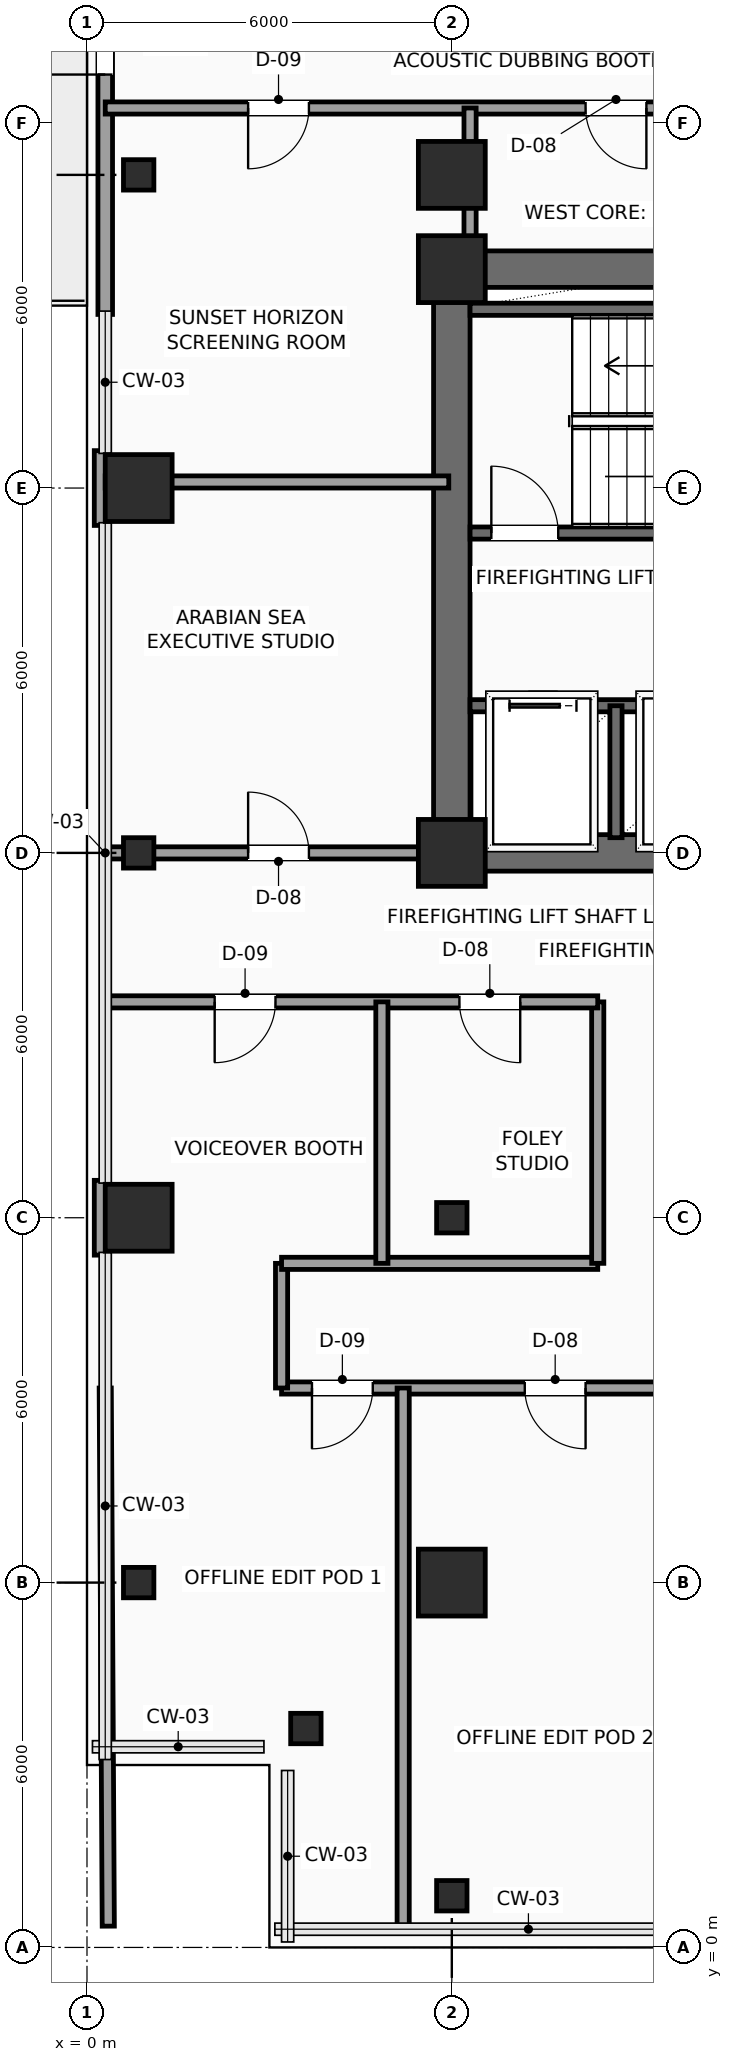
"""IFC4 building model, lengths in metres.
Left out: names, types, materials, properties, quantities, classifications, styles, units other than length and angle.
Written with IfcOpenShell. Run it as: python <this file> out.ifc"""

import sys

from ifc_helpers import new_model, si_unit, direction, frame, frame_2d, origin, origin_2d, place, context, subcontext, project, spatial, rectangle, hollow_rectangle, extrude, element, fill, save


model = new_model("IFC4")
c1 = context("Model", 3, precision=1e-05, world=origin(), true_north=direction((0.0, 1.0)))
c2 = subcontext(c1, "Body", "Model", "MODEL_VIEW")
j1 = project(units=[si_unit("LENGTHUNIT", "METRE"), si_unit("PLANEANGLEUNIT", "RADIAN")], contexts=[c1])
p1 = place(None, origin())
s1 = spatial("IfcSite", under=j1, at=p1, CompositionType="ELEMENT")
p2 = place(p1, origin())
s2 = spatial("IfcBuilding", under=s1, at=p2, CompositionType="ELEMENT")
p3 = place(p2, frame((0.0, 0.0, 119.4)))
s3 = spatial("IfcBuildingStorey", under=s2, at=p3, CompositionType="ELEMENT", Elevation=119.4)
for number, where, z_axis, x_axis in (
    (1, (6.0, 18.0, 0.0), (0.0, 0.0, 1.0), (1.0, 0.0, 0.0)),
    (2, (6.0, 27.6, 0.0), (0.0, 0.0, 1.0), (1.0, 0.0, 0.0)),
):
    element("IfcColumn", number, at=place(p3, frame(where, z_axis=z_axis, x_axis=x_axis)), inside=s3, PredefinedType="COLUMN", context=c2, shape_type="SweptSolid", body=[
        extrude(rectangle(XDim=1.1, YDim=1.1, at=origin_2d()), origin(), (0.0, 0.0, 1.0), 3.75),
    ])
for number, where, z_axis, x_axis in (
    (3, (3.6, 3.6, 0.0), (0.0, 0.0, 1.0), (1.0, 0.0, 0.0)),
    (4, (0.85, 6.0, 0.0), (0.0, 0.0, 1.0), (1.0, 0.0, 0.0)),
):
    element("IfcColumn", number, at=place(p3, frame(where, z_axis=z_axis, x_axis=x_axis)), inside=s3, PredefinedType="COLUMN", context=c2, shape_type="SweptSolid", body=[
        extrude(hollow_rectangle(XDim=0.5, YDim=0.5, WallThickness=0.025, InnerFilletRadius=0.025, OuterFilletRadius=0.04, at=origin_2d()), origin(), (0.0, 0.0, 1.0), 3.75),
    ])
p4 = place(p3, frame((0.85, 12.0, 0.0), z_axis=(0.0, 0.0, 1.0), x_axis=(1.0, 0.0, 0.0)))
e5 = element("IfcColumn", 5, at=p4, inside=s3, PredefinedType="COLUMN", context=c2, shape_type="SweptSolid", body=[
    extrude(rectangle(XDim=1.1, YDim=1.1, at=origin_2d()), origin(), (0.0, 0.0, 1.0), 3.75),
])
p5 = place(p3, frame((0.85, 18.0, 0.0), z_axis=(0.0, 0.0, 1.0), x_axis=(1.0, 0.0, 0.0)))
e6 = element("IfcColumn", 6, at=p5, inside=s3, PredefinedType="COLUMN", context=c2, shape_type="SweptSolid", body=[
    extrude(hollow_rectangle(XDim=0.5, YDim=0.5, WallThickness=0.025, InnerFilletRadius=0.025, OuterFilletRadius=0.04, at=origin_2d()), origin(), (0.0, 0.0, 1.0), 3.75),
])
p6 = place(p3, frame((0.85, 24.0, 0.0), z_axis=(0.0, 0.0, 1.0), x_axis=(1.0, 0.0, 0.0)))
e7 = element("IfcColumn", 7, at=p6, inside=s3, PredefinedType="COLUMN", context=c2, shape_type="SweptSolid", body=[
    extrude(rectangle(XDim=1.1, YDim=1.1, at=origin_2d()), origin(), (0.0, 0.0, 1.0), 3.75),
])
for number, where, z_axis, x_axis in (
    (8, (0.85, 29.15, 0.0), (0.0, 0.0, 1.0), (1.0, 0.0, 0.0)),
    (9, (6.0, 0.85, 0.0), (0.0, 0.0, 1.0), (1.0, 0.0, 0.0)),
):
    element("IfcColumn", number, at=place(p3, frame(where, z_axis=z_axis, x_axis=x_axis)), inside=s3, PredefinedType="COLUMN", context=c2, shape_type="SweptSolid", body=[
        extrude(hollow_rectangle(XDim=0.5, YDim=0.5, WallThickness=0.025, InnerFilletRadius=0.025, OuterFilletRadius=0.04, at=origin_2d()), origin(), (0.0, 0.0, 1.0), 3.75),
    ])
p7 = place(p3, frame((6.0, 6.0, 0.0), z_axis=(0.0, 0.0, 1.0), x_axis=(1.0, 0.0, 0.0)))
e10 = element("IfcColumn", 10, at=p7, inside=s3, PredefinedType="COLUMN", context=c2, shape_type="SweptSolid", body=[
    extrude(rectangle(XDim=1.1, YDim=1.1, at=origin_2d()), origin(), (0.0, 0.0, 1.0), 3.75),
])
p8 = place(p3, frame((6.0, 12.0, 0.0), z_axis=(0.0, 0.0, 1.0), x_axis=(1.0, 0.0, 0.0)))
e11 = element("IfcColumn", 11, at=p8, inside=s3, PredefinedType="COLUMN", context=c2, shape_type="SweptSolid", body=[
    extrude(hollow_rectangle(XDim=0.5, YDim=0.5, WallThickness=0.025, InnerFilletRadius=0.025, OuterFilletRadius=0.04, at=origin_2d()), origin(), (0.0, 0.0, 1.0), 3.75),
])
p9 = place(p3, frame((6.0, 29.15, 0.0), z_axis=(0.0, 0.0, 1.0), x_axis=(1.0, 0.0, 0.0)))
e12 = element("IfcColumn", 12, at=p9, inside=s3, PredefinedType="COLUMN", context=c2, shape_type="SweptSolid", body=[
    extrude(rectangle(XDim=1.1, YDim=1.1, at=origin_2d()), origin(), (0.0, 0.0, 1.0), 3.75),
])
p10 = place(p3, frame((0.3, 26.855, 0.0), z_axis=(0.0, 0.0, 1.0), x_axis=(0.0, 1.0, 0.0)))
e13 = element("IfcWall", 13, at=p10, inside=s3, PredefinedType="SOLIDWALL", context=c2, shape_type="SweptSolid", body=[
    extrude(rectangle(XDim=9.29, YDim=0.24, at=frame_2d((4.645, 0.0))), origin(), (0.0, 0.0, 1.0), 3.525),
])
p11 = place(p10, frame((3.945, 0.0, 0.0)))
e14 = element("IfcOpeningElement", 14, at=p11, cuts=e13, PredefinedType="OPENING", context=c2, shape_type="SweptSolid", body=[
    extrude(rectangle(XDim=1.05, YDim=2.2, at=frame_2d((0.525, 1.1))), frame((0.0, 0.13, 0.0), z_axis=(0.0, -1.0, 0.0), x_axis=(1.0, 0.0, 0.0)), (0.0, 0.0, 1.0), 0.26),
])
for number, where, z_axis, x_axis in (
    (15, (0.24, 11.385, 0.0), (0.0, 0.0, 1.0), (0.0, 1.0, 0.0)),
    (16, (0.24, 23.385, 0.0), (0.0, 0.0, 1.0), (0.0, 1.0, 0.0)),
):
    element("IfcWall", number, at=place(p3, frame(where, z_axis=z_axis, x_axis=x_axis)), inside=s3, PredefinedType="SOLIDWALL", context=c2, shape_type="SweptSolid", body=[
        extrude(rectangle(XDim=1.23, YDim=0.24, at=frame_2d((0.615, 0.0))), origin(), (0.0, 0.0, 1.0), 3.525),
    ])
p12 = place(p3, frame((6.0, 18.0, 0.0), z_axis=(0.0, 0.0, 1.0), x_axis=(1.0, 0.0, 0.0)))
e17 = element("IfcWall", 17, at=p12, inside=s3, PredefinedType="SHEAR", context=c2, shape_type="SweptSolid", body=[
    extrude(rectangle(XDim=12.0, YDim=0.6, at=frame_2d((6.0, 0.0))), origin(), (0.0, 0.0, 1.0), 3.525),
])
p13 = place(p12, frame((7.15, 0.0, 0.0)))
e18 = element("IfcOpeningElement", 18, at=p13, cuts=e17, PredefinedType="OPENING", context=c2, shape_type="SweptSolid", body=[
    extrude(rectangle(XDim=1.6, YDim=2.3, at=frame_2d((0.8, 1.15))), frame((0.0, 0.31, 0.0), z_axis=(0.0, -1.0, 0.0), x_axis=(1.0, 0.0, 0.0)), (0.0, 0.0, 1.0), 0.62),
])
p14 = place(p3, frame((6.0, 27.6, 0.0), z_axis=(0.0, 0.0, 1.0), x_axis=(1.0, 0.0, 0.0)))
e19 = element("IfcWall", 19, at=p14, inside=s3, PredefinedType="SHEAR", context=c2, shape_type="SweptSolid", body=[
    extrude(rectangle(XDim=12.0, YDim=0.6, at=frame_2d((6.0, 0.0))), origin(), (0.0, 0.0, 1.0), 3.525),
])
p15 = place(p14, frame((10.2, 0.0, 0.0)))
e20 = element("IfcOpeningElement", 20, at=p15, cuts=e19, PredefinedType="OPENING", context=c2, shape_type="SweptSolid", body=[
    extrude(rectangle(XDim=0.9, YDim=2.15, at=frame_2d((0.45, 1.075))), frame((0.0, 0.31, 0.0), z_axis=(0.0, -1.0, 0.0), x_axis=(1.0, 0.0, 0.0)), (0.0, 0.0, 1.0), 0.62),
])
p16 = place(p3, frame((6.0, 18.0, 0.0), z_axis=(0.0, 0.0, 1.0), x_axis=(0.0, 1.0, 0.0)))
e21 = element("IfcWall", 21, at=p16, inside=s3, PredefinedType="SHEAR", context=c2, shape_type="SweptSolid", body=[
    extrude(rectangle(XDim=9.6, YDim=0.6, at=frame_2d((4.8, 0.0))), origin(), (0.0, 0.0, 1.0), 3.525),
])
p17 = place(p3, frame((6.3, 23.26, 0.0), z_axis=(0.0, 0.0, 1.0), x_axis=(1.0, 0.0, 0.0)))
e22 = element("IfcWall", 22, at=p17, inside=s3, PredefinedType="SHEAR", context=c2, shape_type="SweptSolid", body=[
    extrude(rectangle(XDim=8.88, YDim=0.2, at=frame_2d((4.44, 0.0))), origin(), (0.0, 0.0, 1.0), 3.525),
])
p18 = place(p17, frame((0.35, 0.0, 0.0)))
e23 = element("IfcOpeningElement", 23, at=p18, cuts=e22, PredefinedType="OPENING", context=c2, shape_type="SweptSolid", body=[
    extrude(rectangle(XDim=1.1, YDim=2.2, at=frame_2d((0.55, 1.1))), frame((0.0, 0.11, 0.0), z_axis=(0.0, -1.0, 0.0), x_axis=(1.0, 0.0, 0.0)), (0.0, 0.0, 1.0), 0.22),
])
p19 = place(p3, frame((6.3, 26.94, 0.0), z_axis=(0.0, 0.0, 1.0), x_axis=(1.0, 0.0, 0.0)))
e24 = element("IfcWall", 24, at=p19, inside=s3, PredefinedType="SHEAR", context=c2, shape_type="SweptSolid", body=[
    extrude(rectangle(XDim=8.88, YDim=0.2, at=frame_2d((4.44, 0.0))), origin(), (0.0, 0.0, 1.0), 3.525),
])
p20 = place(p3, frame((6.3, 20.42, 0.0), z_axis=(0.0, 0.0, 1.0), x_axis=(1.0, 0.0, 0.0)))
e25 = element("IfcWall", 25, at=p20, inside=s3, PredefinedType="SHEAR", context=c2, shape_type="SweptSolid", body=[
    extrude(rectangle(XDim=4.95, YDim=0.2, at=frame_2d((2.475, 0.0))), origin(), (0.0, 0.0, 1.0), 3.525),
])
p21 = place(p20, frame((0.65, 0.0, 0.0)))
e26 = element("IfcOpeningElement", 26, at=p21, cuts=e25, PredefinedType="OPENING", context=c2, shape_type="SweptSolid", body=[
    extrude(rectangle(XDim=1.1, YDim=2.2, at=frame_2d((0.55, 1.1))), frame((0.0, 0.11, 0.0), z_axis=(0.0, -1.0, 0.0), x_axis=(1.0, 0.0, 0.0)), (0.0, 0.0, 1.0), 0.22),
])
p22 = place(p20, frame((3.05, 0.0, 0.0)))
e27 = element("IfcOpeningElement", 27, at=p22, cuts=e25, PredefinedType="OPENING", context=c2, shape_type="SweptSolid", body=[
    extrude(rectangle(XDim=1.1, YDim=2.2, at=frame_2d((0.55, 1.1))), frame((0.0, 0.11, 0.0), z_axis=(0.0, -1.0, 0.0), x_axis=(1.0, 0.0, 0.0)), (0.0, 0.0, 1.0), 0.22),
])
p23 = place(p3, frame((8.7, 18.25, 0.0), z_axis=(0.0, 0.0, 1.0), x_axis=(0.0, 1.0, 0.0)))
e28 = element("IfcWall", 28, at=p23, inside=s3, PredefinedType="SHEAR", context=c2, shape_type="SweptSolid", body=[
    extrude(rectangle(XDim=2.17, YDim=0.2, at=frame_2d((1.085, 0.0))), origin(), (0.0, 0.0, 1.0), 3.525),
])
p24 = place(p3, frame((21.35, 9.2, 0.0), z_axis=(0.0, 0.0, 1.0), x_axis=(-1.0, 0.0, 0.0)))
e29 = element("IfcWall", 29, at=p24, inside=s3, PredefinedType="SOLIDWALL", context=c2, shape_type="SweptSolid", body=[
    extrude(rectangle(XDim=18.15, YDim=0.2, at=frame_2d((9.075, 0.0))), origin(), (0.0, 0.0, 1.0), 3.067),
])
p25 = place(p24, frame((16.65, 0.0, 0.0)))
e30 = element("IfcOpeningElement", 30, at=p25, cuts=e29, PredefinedType="OPENING", context=c2, shape_type="SweptSolid", body=[
    extrude(rectangle(XDim=1.0, YDim=2.2, at=frame_2d((0.5, 1.1))), frame((0.0, 0.11, 0.0), z_axis=(0.0, -1.0, 0.0), x_axis=(1.0, 0.0, 0.0)), (0.0, 0.0, 1.0), 0.22),
])
p26 = place(p24, frame((13.15, 0.0, 0.0)))
e31 = element("IfcOpeningElement", 31, at=p26, cuts=e29, PredefinedType="OPENING", context=c2, shape_type="SweptSolid", body=[
    extrude(rectangle(XDim=1.0, YDim=2.2, at=frame_2d((0.5, 1.1))), frame((0.0, 0.11, 0.0), z_axis=(0.0, -1.0, 0.0), x_axis=(1.0, 0.0, 0.0)), (0.0, 0.0, 1.0), 0.22),
])
p27 = place(p24, frame((8.15, 0.0, 0.0)))
e32 = element("IfcOpeningElement", 32, at=p27, cuts=e29, PredefinedType="OPENING", context=c2, shape_type="SweptSolid", body=[
    extrude(rectangle(XDim=1.0, YDim=2.2, at=frame_2d((0.5, 1.1))), frame((0.0, 0.11, 0.0), z_axis=(0.0, -1.0, 0.0), x_axis=(1.0, 0.0, 0.0)), (0.0, 0.0, 1.0), 0.22),
])
p28 = place(p24, frame((2.575, 0.0, 0.0)))
e33 = element("IfcOpeningElement", 33, at=p28, cuts=e29, PredefinedType="OPENING", context=c2, shape_type="SweptSolid", body=[
    extrude(rectangle(XDim=1.0, YDim=2.2, at=frame_2d((0.5, 1.1))), frame((0.0, 0.11, 0.0), z_axis=(0.0, -1.0, 0.0), x_axis=(1.0, 0.0, 0.0)), (0.0, 0.0, 1.0), 0.22),
])
p29 = place(p3, frame((3.2, 9.2, 0.0), z_axis=(0.0, 0.0, 1.0), x_axis=(0.0, 1.0, 0.0)))
e34 = element("IfcWall", 34, at=p29, inside=s3, PredefinedType="SOLIDWALL", context=c2, shape_type="SweptSolid", body=[
    extrude(rectangle(XDim=2.05, YDim=0.2, at=frame_2d((1.025, 0.0))), origin(), (0.0, 0.0, 1.0), 3.525),
])
p30 = place(p3, frame((3.2, 11.25, 0.0), z_axis=(0.0, 0.0, 1.0), x_axis=(1.0, 0.0, 0.0)))
e35 = element("IfcWall", 35, at=p30, inside=s3, PredefinedType="SOLIDWALL", context=c2, shape_type="SweptSolid", body=[
    extrude(rectangle(XDim=5.2, YDim=0.2, at=frame_2d((2.6, 0.0))), origin(), (0.0, 0.0, 1.0), 3.525),
])
p31 = place(p3, frame((8.4, 11.25, 0.0), z_axis=(0.0, 0.0, 1.0), x_axis=(0.0, 1.0, 0.0)))
e36 = element("IfcWall", 36, at=p31, inside=s3, PredefinedType="SOLIDWALL", context=c2, shape_type="SweptSolid", body=[
    extrude(rectangle(XDim=4.3, YDim=0.2, at=frame_2d((2.15, 0.0))), origin(), (0.0, 0.0, 1.0), 3.525),
])
p32 = place(p3, frame((8.4, 15.55, 0.0), z_axis=(0.0, 0.0, 1.0), x_axis=(-1.0, 0.0, 0.0)))
e37 = element("IfcWall", 37, at=p32, inside=s3, PredefinedType="SOLIDWALL", context=c2, shape_type="SweptSolid", body=[
    extrude(rectangle(XDim=8.1, YDim=0.2, at=frame_2d((4.05, 0.0))), origin(), (0.0, 0.0, 1.0), 3.525),
])
p33 = place(p32, frame((5.3, 0.0, 0.0)))
e38 = element("IfcOpeningElement", 38, at=p33, cuts=e37, PredefinedType="OPENING", context=c2, shape_type="SweptSolid", body=[
    extrude(rectangle(XDim=1.0, YDim=2.2, at=frame_2d((0.5, 1.1))), frame((0.0, 0.11, 0.0), z_axis=(0.0, -1.0, 0.0), x_axis=(1.0, 0.0, 0.0)), (0.0, 0.0, 1.0), 0.22),
])
p34 = place(p32, frame((1.275, 0.0, 0.0)))
e39 = element("IfcOpeningElement", 39, at=p34, cuts=e37, PredefinedType="OPENING", context=c2, shape_type="SweptSolid", body=[
    extrude(rectangle(XDim=1.0, YDim=2.2, at=frame_2d((0.5, 1.1))), frame((0.0, 0.11, 0.0), z_axis=(0.0, -1.0, 0.0), x_axis=(1.0, 0.0, 0.0)), (0.0, 0.0, 1.0), 0.22),
])
p35 = place(p3, frame((15.88, 30.25, 0.0), z_axis=(0.0, 0.0, 1.0), x_axis=(-1.0, 0.0, 0.0)))
e40 = element("IfcWall", 40, at=p35, inside=s3, PredefinedType="SOLIDWALL", context=c2, shape_type="SweptSolid", body=[
    extrude(rectangle(XDim=15.58, YDim=0.2, at=frame_2d((7.79, 0.0))), origin(), (0.0, 0.0, 1.0), 3.525),
])
p36 = place(p35, frame((12.23, 0.0, 0.0)))
e41 = element("IfcOpeningElement", 41, at=p36, cuts=e40, PredefinedType="OPENING", context=c2, shape_type="SweptSolid", body=[
    extrude(rectangle(XDim=1.0, YDim=2.2, at=frame_2d((0.5, 1.1))), frame((0.0, 0.11, 0.0), z_axis=(0.0, -1.0, 0.0), x_axis=(1.0, 0.0, 0.0)), (0.0, 0.0, 1.0), 0.22),
])
p37 = place(p35, frame((6.68, 0.0, 0.0)))
e42 = element("IfcOpeningElement", 42, at=p37, cuts=e40, PredefinedType="OPENING", context=c2, shape_type="SweptSolid", body=[
    extrude(rectangle(XDim=1.0, YDim=2.2, at=frame_2d((0.5, 1.1))), frame((0.0, 0.11, 0.0), z_axis=(0.0, -1.0, 0.0), x_axis=(1.0, 0.0, 0.0)), (0.0, 0.0, 1.0), 0.22),
])
p38 = place(p35, frame((1.93, 0.0, 0.0)))
e43 = element("IfcOpeningElement", 43, at=p38, cuts=e40, PredefinedType="OPENING", context=c2, shape_type="SweptSolid", body=[
    extrude(rectangle(XDim=1.0, YDim=2.2, at=frame_2d((0.5, 1.1))), frame((0.0, 0.11, 0.0), z_axis=(0.0, -1.0, 0.0), x_axis=(1.0, 0.0, 0.0)), (0.0, 0.0, 1.0), 0.22),
])
p39 = place(p3, frame((0.3, 18.0, 0.0), z_axis=(0.0, 0.0, 1.0), x_axis=(1.0, 0.0, 0.0)))
e44 = element("IfcWall", 44, at=p39, inside=s3, PredefinedType="PARTITIONING", context=c2, shape_type="SweptSolid", body=[
    extrude(rectangle(XDim=5.65, YDim=0.2, at=frame_2d((2.825, 0.0))), origin(), (0.0, 0.0, 1.0), 3.017),
])
p40 = place(p39, frame((2.35, 0.0, 0.0)))
e45 = element("IfcOpeningElement", 45, at=p40, cuts=e44, PredefinedType="OPENING", context=c2, shape_type="SweptSolid", body=[
    extrude(rectangle(XDim=1.0, YDim=2.2, at=frame_2d((0.5, 1.1))), frame((0.0, 0.11, 0.0), z_axis=(0.0, -1.0, 0.0), x_axis=(1.0, 0.0, 0.0)), (0.0, 0.0, 1.0), 0.22),
])
p41 = place(p3, frame((0.3, 24.1, 0.0), z_axis=(0.0, 0.0, 1.0), x_axis=(1.0, 0.0, 0.0)))
e46 = element("IfcWall", 46, at=p41, inside=s3, PredefinedType="PARTITIONING", context=c2, shape_type="SweptSolid", body=[
    extrude(rectangle(XDim=5.65, YDim=0.2, at=frame_2d((2.825, 0.0))), origin(), (0.0, 0.0, 1.0), 3.525),
])
p42 = place(p3, frame((6.3, 27.65, 0.0), z_axis=(0.0, 0.0, 1.0), x_axis=(0.0, 1.0, 0.0)))
e47 = element("IfcWall", 47, at=p42, inside=s3, PredefinedType="PARTITIONING", context=c2, shape_type="SweptSolid", body=[
    extrude(rectangle(XDim=2.6, YDim=0.2, at=frame_2d((1.3, 0.0))), origin(), (0.0, 0.0, 1.0), 3.017),
])
p43 = place(p3, frame((0.35, 0.35, 0.0), z_axis=(0.0, 0.0, 1.0), x_axis=(-0.005655237989, 0.999984009014, 0.0)))
e48 = element("IfcWall", 48, at=p43, inside=s3, PredefinedType="PARTITIONING", context=c2, shape_type="SweptSolid", body=[
    extrude(rectangle(XDim=8.85, YDim=0.2, at=frame_2d((4.425, 0.0))), origin(), (0.0, 0.0, 1.0), 3.525),
])
p44 = place(p3, frame((5.2, 0.3, 0.0), z_axis=(0.0, 0.0, 1.0), x_axis=(0.0, 1.0, 0.0)))
e49 = element("IfcWall", 49, at=p44, inside=s3, PredefinedType="PARTITIONING", context=c2, shape_type="SweptSolid", body=[
    extrude(rectangle(XDim=8.9, YDim=0.2, at=frame_2d((4.45, 0.0))), origin(), (0.0, 0.0, 1.0), 3.525),
])
p45 = place(p3, frame((4.85, 11.25, 0.0), z_axis=(0.0, 0.0, 1.0), x_axis=(0.0, 1.0, 0.0)))
e50 = element("IfcWall", 50, at=p45, inside=s3, PredefinedType="PARTITIONING", context=c2, shape_type="SweptSolid", body=[
    extrude(rectangle(XDim=4.3, YDim=0.2, at=frame_2d((2.15, 0.0))), origin(), (0.0, 0.0, 1.0), 3.525),
])
p46 = place(p11, origin())
e51 = element("IfcDoor", 51, at=p46, inside=s3, OperationType="SINGLE_SWING_LEFT", PredefinedType="DOOR", context=c2, shape_type="SweptSolid", body=[
    extrude(rectangle(XDim=1.05, YDim=2.2, at=frame_2d((0.525, 1.1))), frame((0.0, 0.025, 0.0), z_axis=(0.0, -1.0, 0.0), x_axis=(1.0, 0.0, 0.0)), (0.0, 0.0, 1.0), 0.05),
])
fill(e14, e51)
p47 = place(p18, origin())
e52 = element("IfcDoor", 52, at=p47, inside=s3, OperationType="SINGLE_SWING_LEFT", PredefinedType="DOOR", context=c2, shape_type="SweptSolid", body=[
    extrude(rectangle(XDim=1.1, YDim=2.2, at=frame_2d((0.55, 1.1))), frame((0.0, 0.025, 0.0), z_axis=(0.0, -1.0, 0.0), x_axis=(1.0, 0.0, 0.0)), (0.0, 0.0, 1.0), 0.05),
])
fill(e23, e52)
p48 = place(p21, origin())
e53 = element("IfcDoor", 53, at=p48, inside=s3, OperationType="SLIDING_TO_LEFT", PredefinedType="DOOR", context=c2, shape_type="SweptSolid", body=[
    extrude(rectangle(XDim=1.1, YDim=2.2, at=frame_2d((0.55, 1.1))), frame((0.0, 0.025, 0.0), z_axis=(0.0, -1.0, 0.0), x_axis=(1.0, 0.0, 0.0)), (0.0, 0.0, 1.0), 0.05),
])
fill(e26, e53)
p49 = place(p25, origin())
e54 = element("IfcDoor", 54, at=p49, inside=s3, OperationType="SINGLE_SWING_RIGHT", PredefinedType="DOOR", context=c2, shape_type="SweptSolid", body=[
    extrude(rectangle(XDim=1.0, YDim=2.2, at=frame_2d((0.5, 1.1))), frame((0.0, 0.025, 0.0), z_axis=(0.0, -1.0, 0.0), x_axis=(1.0, 0.0, 0.0)), (0.0, 0.0, 1.0), 0.05),
])
fill(e30, e54)
p50 = place(p26, origin())
e55 = element("IfcDoor", 55, at=p50, inside=s3, OperationType="SINGLE_SWING_LEFT", PredefinedType="DOOR", context=c2, shape_type="SweptSolid", body=[
    extrude(rectangle(XDim=1.0, YDim=2.2, at=frame_2d((0.5, 1.1))), frame((0.0, 0.025, 0.0), z_axis=(0.0, -1.0, 0.0), x_axis=(1.0, 0.0, 0.0)), (0.0, 0.0, 1.0), 0.05),
])
fill(e31, e55)
p51 = place(p33, origin())
e56 = element("IfcDoor", 56, at=p51, inside=s3, OperationType="SINGLE_SWING_RIGHT", PredefinedType="DOOR", context=c2, shape_type="SweptSolid", body=[
    extrude(rectangle(XDim=1.0, YDim=2.2, at=frame_2d((0.5, 1.1))), frame((0.0, 0.025, 0.0), z_axis=(0.0, -1.0, 0.0), x_axis=(1.0, 0.0, 0.0)), (0.0, 0.0, 1.0), 0.05),
])
fill(e38, e56)
p52 = place(p34, origin())
e57 = element("IfcDoor", 57, at=p52, inside=s3, OperationType="SINGLE_SWING_LEFT", PredefinedType="DOOR", context=c2, shape_type="SweptSolid", body=[
    extrude(rectangle(XDim=1.0, YDim=2.2, at=frame_2d((0.5, 1.1))), frame((0.0, 0.025, 0.0), z_axis=(0.0, -1.0, 0.0), x_axis=(1.0, 0.0, 0.0)), (0.0, 0.0, 1.0), 0.05),
])
fill(e39, e57)
p53 = place(p36, origin())
e58 = element("IfcDoor", 58, at=p53, inside=s3, OperationType="SINGLE_SWING_RIGHT", PredefinedType="DOOR", context=c2, shape_type="SweptSolid", body=[
    extrude(rectangle(XDim=1.0, YDim=2.2, at=frame_2d((0.5, 1.1))), frame((0.0, 0.025, 0.0), z_axis=(0.0, -1.0, 0.0), x_axis=(1.0, 0.0, 0.0)), (0.0, 0.0, 1.0), 0.05),
])
fill(e41, e58)
p54 = place(p37, origin())
e59 = element("IfcDoor", 59, at=p54, inside=s3, OperationType="SINGLE_SWING_LEFT", PredefinedType="DOOR", context=c2, shape_type="SweptSolid", body=[
    extrude(rectangle(XDim=1.0, YDim=2.2, at=frame_2d((0.5, 1.1))), frame((0.0, 0.025, 0.0), z_axis=(0.0, -1.0, 0.0), x_axis=(1.0, 0.0, 0.0)), (0.0, 0.0, 1.0), 0.05),
])
fill(e42, e59)
p55 = place(p40, origin())
e60 = element("IfcDoor", 60, at=p55, inside=s3, OperationType="SINGLE_SWING_LEFT", PredefinedType="DOOR", context=c2, shape_type="SweptSolid", body=[
    extrude(rectangle(XDim=1.0, YDim=2.2, at=frame_2d((0.5, 1.1))), frame((0.0, 0.025, 0.0), z_axis=(0.0, -1.0, 0.0), x_axis=(1.0, 0.0, 0.0)), (0.0, 0.0, 1.0), 0.05),
])
fill(e45, e60)
save(model, sys.argv[1])
